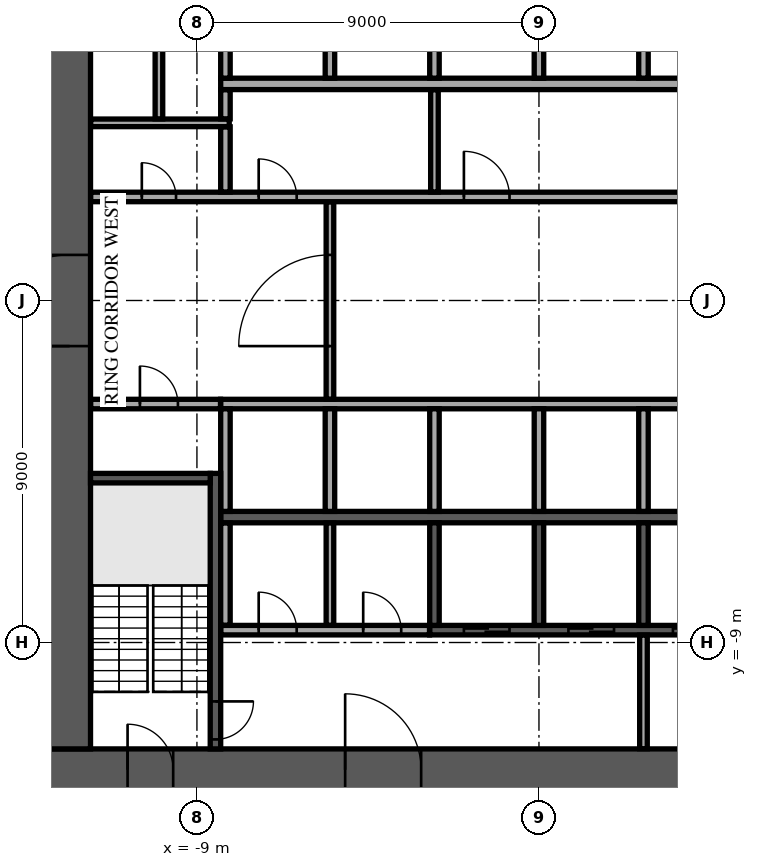
"""IFC4 building model, lengths in metres.
Left out: names, types, materials, properties, quantities, classifications, styles, units other than length and angle.
Written with IfcOpenShell. Run it as: python <this file> out.ifc"""

import sys

from ifc_helpers import new_model, si_unit, direction, frame, frame_2d, origin, place, context, subcontext, project, spatial, rectangle, extrude, element, fill, save


model = new_model("IFC4")
c1 = context("Model", 3, precision=1e-05, world=origin(), true_north=direction((0.0, 1.0)))
c2 = subcontext(c1, "Body", "Model", "MODEL_VIEW")
j1 = project(units=[si_unit("LENGTHUNIT", "METRE"), si_unit("PLANEANGLEUNIT", "RADIAN")], contexts=[c1])
p1 = place(None, origin())
s1 = spatial("IfcSite", under=j1, at=p1, CompositionType="ELEMENT")
p2 = place(p1, origin())
s2 = spatial("IfcBuilding", under=s1, at=p2, CompositionType="ELEMENT")
p3 = place(p2, frame((0.0, 0.0, 86.1)))
s3 = spatial("IfcBuildingStorey", under=s2, at=p3, CompositionType="ELEMENT", Elevation=86.1)
p4 = place(p3, frame((-12.9, -12.35, 0.0), z_axis=(0.0, 0.0, 1.0), x_axis=(1.0, 0.0, 0.0)))
e1 = element("IfcWall", 1, at=p4, inside=s3, PredefinedType="SHEAR", context=c2, shape_type="SweptSolid", body=[
    extrude(rectangle(XDim=25.8, YDim=1.1, at=frame_2d((12.9, 0.0))), origin(), (0.0, 0.0, 1.0), 3.58),
])
p5 = place(p4, frame((7.8, 0.0, 0.0)))
e2 = element("IfcOpeningElement", 2, at=p5, cuts=e1, PredefinedType="OPENING", context=c2, shape_type="SweptSolid", body=[
    extrude(rectangle(XDim=2.0, YDim=2.1, at=frame_2d((1.0, 1.05))), frame((0.0, 0.56, 0.0), z_axis=(0.0, -1.0, 0.0), x_axis=(1.0, 0.0, 0.0)), (0.0, 0.0, 1.0), 1.12),
])
p6 = place(p4, frame((17.925, 0.0, 0.0)))
e3 = element("IfcOpeningElement", 3, at=p6, cuts=e1, PredefinedType="OPENING", context=c2, shape_type="SweptSolid", body=[
    extrude(rectangle(XDim=1.2, YDim=2.1, at=frame_2d((0.6, 1.05))), frame((0.0, 0.56, 0.0), z_axis=(0.0, -1.0, 0.0), x_axis=(1.0, 0.0, 0.0)), (0.0, 0.0, 1.0), 1.12),
])
p7 = place(p4, frame((2.075, 0.0, 0.0)))
e4 = element("IfcOpeningElement", 4, at=p7, cuts=e1, PredefinedType="OPENING", context=c2, shape_type="SweptSolid", body=[
    extrude(rectangle(XDim=1.2, YDim=2.1, at=frame_2d((0.6, 1.05))), frame((0.0, 0.56, 0.0), z_axis=(0.0, -1.0, 0.0), x_axis=(1.0, 0.0, 0.0)), (0.0, 0.0, 1.0), 1.12),
])
p8 = place(p4, frame((22.525, 0.0, 0.0)))
e5 = element("IfcOpeningElement", 5, at=p8, cuts=e1, PredefinedType="OPENING", context=c2, shape_type="SweptSolid", body=[
    extrude(rectangle(XDim=1.2, YDim=2.1, at=frame_2d((0.6, 1.05))), frame((0.0, 0.56, 0.0), z_axis=(0.0, -1.0, 0.0), x_axis=(1.0, 0.0, 0.0)), (0.0, 0.0, 1.0), 1.12),
])
p9 = place(p3, frame((-12.35, -11.8, 0.0), z_axis=(0.0, 0.0, 1.0), x_axis=(0.0, 1.0, 0.0)))
e6 = element("IfcWall", 6, at=p9, inside=s3, PredefinedType="SHEAR", context=c2, shape_type="SweptSolid", body=[
    extrude(rectangle(XDim=23.6, YDim=1.1, at=frame_2d((11.8, 0.0))), origin(), (0.0, 0.0, 1.0), 3.58),
])
p10 = place(p9, frame((10.6, 0.0, 0.0)))
e7 = element("IfcOpeningElement", 7, at=p10, cuts=e6, PredefinedType="OPENING", context=c2, shape_type="SweptSolid", body=[
    extrude(rectangle(XDim=2.4, YDim=2.4, at=frame_2d((1.2, 1.2))), frame((0.0, 0.56, 0.0), z_axis=(0.0, -1.0, 0.0), x_axis=(1.0, 0.0, 0.0)), (0.0, 0.0, 1.0), 1.12),
])
for number, where, z_axis, x_axis in (
    (8, (-8.375, 5.7, 0.0), (0.0, 0.0, 1.0), (1.0, 0.0, 0.0)),
    (9, (-8.375, -5.7, 0.0), (0.0, 0.0, 1.0), (1.0, 0.0, 0.0)),
):
    element("IfcWall", number, at=place(p3, frame(where, z_axis=z_axis, x_axis=x_axis)), inside=s3, PredefinedType="SOLIDWALL", context=c2, shape_type="SweptSolid", body=[
        extrude(rectangle(XDim=16.75, YDim=0.3, at=frame_2d((8.375, 0.0))), origin(), (0.0, 0.0, 1.0), 3.58),
    ])
for number, where, z_axis, x_axis in (
    (10, (-8.25, 5.85, 0.0), (0.0, 0.0, 1.0), (0.0, 1.0, 0.0)),
    (11, (-5.5, 5.85, 0.0), (0.0, 0.0, 1.0), (0.0, 1.0, 0.0)),
    (12, (-2.75, 5.85, 0.0), (0.0, 0.0, 1.0), (0.0, 1.0, 0.0)),
    (13, (0.0, 5.85, 0.0), (0.0, 0.0, 1.0), (0.0, 1.0, 0.0)),
    (14, (2.75, 5.85, 0.0), (0.0, 0.0, 1.0), (0.0, 1.0, 0.0)),
):
    element("IfcWall", number, at=place(p3, frame(where, z_axis=z_axis, x_axis=x_axis)), inside=s3, PredefinedType="SOLIDWALL", context=c2, shape_type="SweptSolid", body=[
        extrude(rectangle(XDim=2.7, YDim=0.25, at=frame_2d((1.35, 0.0))), origin(), (0.0, 0.0, 1.0), 3.58),
    ])
p11 = place(p3, frame((-8.375, -2.725, 0.0), z_axis=(0.0, 0.0, 1.0), x_axis=(1.0, 0.0, 0.0)))
e15 = element("IfcWall", 15, at=p11, inside=s3, PredefinedType="SOLIDWALL", context=c2, shape_type="SweptSolid", body=[
    extrude(rectangle(XDim=14.0, YDim=0.25, at=frame_2d((7.0, 0.0))), origin(), (0.0, 0.0, 1.0), 3.58),
])
for number, where, z_axis, x_axis in (
    (16, (-8.25, -5.55, 0.0), (0.0, 0.0, 1.0), (0.0, 1.0, 0.0)),
    (17, (-5.5, -5.55, 0.0), (0.0, 0.0, 1.0), (0.0, 1.0, 0.0)),
    (18, (-2.75, -5.55, 0.0), (0.0, 0.0, 1.0), (0.0, 1.0, 0.0)),
    (19, (0.0, -5.55, 0.0), (0.0, 0.0, 1.0), (0.0, 1.0, 0.0)),
    (20, (2.75, -5.55, 0.0), (0.0, 0.0, 1.0), (0.0, 1.0, 0.0)),
):
    element("IfcWall", number, at=place(p3, frame(where, z_axis=z_axis, x_axis=x_axis)), inside=s3, PredefinedType="SOLIDWALL", context=c2, shape_type="SweptSolid", body=[
        extrude(rectangle(XDim=2.7, YDim=0.25, at=frame_2d((1.35, 0.0))), origin(), (0.0, 0.0, 1.0), 3.58),
    ])
p12 = place(p3, frame((-2.875, -8.675, 0.0), z_axis=(0.0, 0.0, 1.0), x_axis=(1.0, 0.0, 0.0)))
e21 = element("IfcWall", 21, at=p12, inside=s3, PredefinedType="SOLIDWALL", context=c2, shape_type="SweptSolid", body=[
    extrude(rectangle(XDim=11.25, YDim=0.25, at=frame_2d((5.625, 0.0))), origin(), (0.0, 0.0, 1.0), 3.58),
])
p13 = place(p12, frame((0.9, 0.0, 0.0)))
e22 = element("IfcOpeningElement", 22, at=p13, cuts=e21, PredefinedType="OPENING", context=c2, shape_type="SweptSolid", body=[
    extrude(rectangle(XDim=1.2, YDim=2.1, at=frame_2d((0.6, 1.05))), frame((0.0, 0.135, 0.0), z_axis=(0.0, -1.0, 0.0), x_axis=(1.0, 0.0, 0.0)), (0.0, 0.0, 1.0), 0.27),
])
p14 = place(p12, frame((3.65, 0.0, 0.0)))
e23 = element("IfcOpeningElement", 23, at=p14, cuts=e21, PredefinedType="OPENING", context=c2, shape_type="SweptSolid", body=[
    extrude(rectangle(XDim=1.2, YDim=2.1, at=frame_2d((0.6, 1.05))), frame((0.0, 0.135, 0.0), z_axis=(0.0, -1.0, 0.0), x_axis=(1.0, 0.0, 0.0)), (0.0, 0.0, 1.0), 0.27),
])
p15 = place(p12, frame((6.4, 0.0, 0.0)))
e24 = element("IfcOpeningElement", 24, at=p15, cuts=e21, PredefinedType="OPENING", context=c2, shape_type="SweptSolid", body=[
    extrude(rectangle(XDim=1.2, YDim=2.1, at=frame_2d((0.6, 1.05))), frame((0.0, 0.135, 0.0), z_axis=(0.0, -1.0, 0.0), x_axis=(1.0, 0.0, 0.0)), (0.0, 0.0, 1.0), 0.27),
])
p16 = place(p12, frame((9.15, 0.0, 0.0)))
e25 = element("IfcOpeningElement", 25, at=p16, cuts=e21, PredefinedType="OPENING", context=c2, shape_type="SweptSolid", body=[
    extrude(rectangle(XDim=1.2, YDim=2.1, at=frame_2d((0.6, 1.05))), frame((0.0, 0.135, 0.0), z_axis=(0.0, -1.0, 0.0), x_axis=(1.0, 0.0, 0.0)), (0.0, 0.0, 1.0), 0.27),
])
for number, where, z_axis, x_axis in (
    (26, (-2.75, -8.55, 0.0), (0.0, 0.0, 1.0), (0.0, 1.0, 0.0)),
    (27, (0.0, -8.55, 0.0), (0.0, 0.0, 1.0), (0.0, 1.0, 0.0)),
    (28, (2.75, -8.55, 0.0), (0.0, 0.0, 1.0), (0.0, 1.0, 0.0)),
):
    element("IfcWall", number, at=place(p3, frame(where, z_axis=z_axis, x_axis=x_axis)), inside=s3, PredefinedType="SOLIDWALL", context=c2, shape_type="SweptSolid", body=[
        extrude(rectangle(XDim=2.7, YDim=0.25, at=frame_2d((1.35, 0.0))), origin(), (0.0, 0.0, 1.0), 3.58),
    ])
p17 = place(p3, frame((-8.512, -4.55, 0.0), z_axis=(0.0, 0.0, 1.0), x_axis=(0.0, -1.0, 0.0)))
e29 = element("IfcWall", 29, at=p17, inside=s3, PredefinedType="SOLIDWALL", context=c2, shape_type="SweptSolid", body=[
    extrude(rectangle(XDim=7.25, YDim=0.275, at=frame_2d((3.625, 0.0))), origin(), (0.0, 0.0, 1.0), 3.58),
])
p18 = place(p17, frame((6.0, 0.0, 0.0)))
e30 = element("IfcOpeningElement", 30, at=p18, cuts=e29, PredefinedType="OPENING", context=c2, shape_type="SweptSolid", body=[
    extrude(rectangle(XDim=1.0, YDim=2.1, at=frame_2d((0.5, 1.05))), frame((0.0, 0.147, 0.0), z_axis=(0.0, -1.0, 0.0), x_axis=(1.0, 0.0, 0.0)), (0.0, 0.0, 1.0), 0.295),
])
p19 = place(p3, frame((-8.65, -4.675, 0.0), z_axis=(0.0, 0.0, 1.0), x_axis=(-1.0, 0.0, 0.0)))
e31 = element("IfcWall", 31, at=p19, inside=s3, PredefinedType="SOLIDWALL", context=c2, shape_type="SweptSolid", body=[
    extrude(rectangle(XDim=3.15, YDim=0.25, at=frame_2d((1.575, 0.0))), origin(), (0.0, 0.0, 1.0), 3.58),
])
p20 = place(p3, frame((2.75, -11.795, 0.0), z_axis=(0.0, 0.0, 1.0), x_axis=(0.0, 1.0, 0.0)))
e32 = element("IfcWall", 32, at=p20, inside=s3, PredefinedType="PARTITIONING", context=c2, shape_type="SweptSolid", body=[
    extrude(rectangle(XDim=2.99, YDim=0.2, at=frame_2d((1.495, 0.0))), origin(), (0.0, 0.0, 1.0), 3.58),
])
p21 = place(p3, frame((-8.37, -8.675, 0.0), z_axis=(0.0, 0.0, 1.0), x_axis=(1.0, 0.0, 0.0)))
e33 = element("IfcWall", 33, at=p21, inside=s3, PredefinedType="PARTITIONING", context=c2, shape_type="SweptSolid", body=[
    extrude(rectangle(XDim=5.49, YDim=0.25, at=frame_2d((2.745, 0.0))), origin(), (0.0, 0.0, 1.0), 3.58),
])
p22 = place(p21, frame((0.995, 0.0, 0.0)))
e34 = element("IfcOpeningElement", 34, at=p22, cuts=e33, PredefinedType="OPENING", context=c2, shape_type="SweptSolid", body=[
    extrude(rectangle(XDim=1.0, YDim=2.1, at=frame_2d((0.5, 1.05))), frame((0.0, 0.135, 0.0), z_axis=(0.0, -1.0, 0.0), x_axis=(1.0, 0.0, 0.0)), (0.0, 0.0, 1.0), 0.27),
])
p23 = place(p21, frame((3.745, 0.0, 0.0)))
e35 = element("IfcOpeningElement", 35, at=p23, cuts=e33, PredefinedType="OPENING", context=c2, shape_type="SweptSolid", body=[
    extrude(rectangle(XDim=1.0, YDim=2.1, at=frame_2d((0.5, 1.05))), frame((0.0, 0.135, 0.0), z_axis=(0.0, -1.0, 0.0), x_axis=(1.0, 0.0, 0.0)), (0.0, 0.0, 1.0), 0.27),
])
p24 = place(p3, frame((-8.25, -8.545, 0.0), z_axis=(0.0, 0.0, 1.0), x_axis=(0.0, 1.0, 0.0)))
e36 = element("IfcWall", 36, at=p24, inside=s3, PredefinedType="PARTITIONING", context=c2, shape_type="SweptSolid", body=[
    extrude(rectangle(XDim=2.69, YDim=0.25, at=frame_2d((1.345, 0.0))), origin(), (0.0, 0.0, 1.0), 3.58),
])
p25 = place(p3, frame((-5.5, -8.545, 0.0), z_axis=(0.0, 0.0, 1.0), x_axis=(0.0, 1.0, 0.0)))
e37 = element("IfcWall", 37, at=p25, inside=s3, PredefinedType="PARTITIONING", context=c2, shape_type="SweptSolid", body=[
    extrude(rectangle(XDim=2.69, YDim=0.2, at=frame_2d((1.345, 0.0))), origin(), (0.0, 0.0, 1.0), 3.58),
])
p26 = place(p3, frame((-11.795, -2.725, 0.0), z_axis=(0.0, 0.0, 1.0), x_axis=(1.0, 0.0, 0.0)))
e38 = element("IfcWall", 38, at=p26, inside=s3, PredefinedType="PARTITIONING", context=c2, shape_type="SweptSolid", body=[
    extrude(rectangle(XDim=3.415, YDim=0.25, at=frame_2d((1.708, 0.0))), origin(), (0.0, 0.0, 1.0), 3.58),
])
p27 = place(p26, frame((1.295, 0.0, 0.0)))
e39 = element("IfcOpeningElement", 39, at=p27, cuts=e38, PredefinedType="OPENING", context=c2, shape_type="SweptSolid", body=[
    extrude(rectangle(XDim=1.0, YDim=2.1, at=frame_2d((0.5, 1.05))), frame((0.0, 0.135, 0.0), z_axis=(0.0, -1.0, 0.0), x_axis=(1.0, 0.0, 0.0)), (0.0, 0.0, 1.0), 0.27),
])
p28 = place(p3, frame((-5.5, -2.595, 0.0), z_axis=(0.0, 0.0, 1.0), x_axis=(0.0, 1.0, 0.0)))
e40 = element("IfcWall", 40, at=p28, inside=s3, PredefinedType="PARTITIONING", context=c2, shape_type="SweptSolid", body=[
    extrude(rectangle(XDim=5.19, YDim=0.2, at=frame_2d((2.595, 0.0))), origin(), (0.0, 0.0, 1.0), 3.58),
])
p29 = place(p28, frame((1.395, 0.0, 0.0)))
e41 = element("IfcOpeningElement", 41, at=p29, cuts=e40, PredefinedType="OPENING", context=c2, shape_type="SweptSolid", body=[
    extrude(rectangle(XDim=2.4, YDim=2.4, at=frame_2d((1.2, 1.2))), frame((0.0, 0.11, 0.0), z_axis=(0.0, -1.0, 0.0), x_axis=(1.0, 0.0, 0.0)), (0.0, 0.0, 1.0), 0.22),
])
p30 = place(p3, frame((-11.795, 2.725, 0.0), z_axis=(0.0, 0.0, 1.0), x_axis=(1.0, 0.0, 0.0)))
e42 = element("IfcWall", 42, at=p30, inside=s3, PredefinedType="PARTITIONING", context=c2, shape_type="SweptSolid", body=[
    extrude(rectangle(XDim=23.59, YDim=0.25, at=frame_2d((11.795, 0.0))), origin(), (0.0, 0.0, 1.0), 3.58),
])
p31 = place(p30, frame((21.345, 0.0, 0.0)))
e43 = element("IfcOpeningElement", 43, at=p31, cuts=e42, PredefinedType="OPENING", context=c2, shape_type="SweptSolid", body=[
    extrude(rectangle(XDim=0.9, YDim=2.1, at=frame_2d((0.45, 1.05))), frame((0.0, 0.135, 0.0), z_axis=(0.0, -1.0, 0.0), x_axis=(1.0, 0.0, 0.0)), (0.0, 0.0, 1.0), 0.27),
])
p32 = place(p30, frame((1.345, 0.0, 0.0)))
e44 = element("IfcOpeningElement", 44, at=p32, cuts=e42, PredefinedType="OPENING", context=c2, shape_type="SweptSolid", body=[
    extrude(rectangle(XDim=0.9, YDim=2.1, at=frame_2d((0.45, 1.05))), frame((0.0, 0.135, 0.0), z_axis=(0.0, -1.0, 0.0), x_axis=(1.0, 0.0, 0.0)), (0.0, 0.0, 1.0), 0.27),
])
p33 = place(p30, frame((4.42, 0.0, 0.0)))
e45 = element("IfcOpeningElement", 45, at=p33, cuts=e42, PredefinedType="OPENING", context=c2, shape_type="SweptSolid", body=[
    extrude(rectangle(XDim=1.0, YDim=2.1, at=frame_2d((0.5, 1.05))), frame((0.0, 0.135, 0.0), z_axis=(0.0, -1.0, 0.0), x_axis=(1.0, 0.0, 0.0)), (0.0, 0.0, 1.0), 0.27),
])
p34 = place(p30, frame((9.82, 0.0, 0.0)))
e46 = element("IfcOpeningElement", 46, at=p34, cuts=e42, PredefinedType="OPENING", context=c2, shape_type="SweptSolid", body=[
    extrude(rectangle(XDim=1.2, YDim=2.1, at=frame_2d((0.6, 1.05))), frame((0.0, 0.135, 0.0), z_axis=(0.0, -1.0, 0.0), x_axis=(1.0, 0.0, 0.0)), (0.0, 0.0, 1.0), 0.27),
])
p35 = place(p3, frame((-8.25, 2.855, 0.0), z_axis=(0.0, 0.0, 1.0), x_axis=(0.0, 1.0, 0.0)))
e47 = element("IfcWall", 47, at=p35, inside=s3, PredefinedType="PARTITIONING", context=c2, shape_type="SweptSolid", body=[
    extrude(rectangle(XDim=1.715, YDim=0.25, at=frame_2d((0.857, 0.0))), origin(), (0.0, 0.0, 1.0), 3.58),
])
p36 = place(p3, frame((-2.75, 2.855, 0.0), z_axis=(0.0, 0.0, 1.0), x_axis=(0.0, 1.0, 0.0)))
e48 = element("IfcWall", 48, at=p36, inside=s3, PredefinedType="PARTITIONING", context=c2, shape_type="SweptSolid", body=[
    extrude(rectangle(XDim=2.69, YDim=0.2, at=frame_2d((1.345, 0.0))), origin(), (0.0, 0.0, 1.0), 3.58),
])
p37 = place(p3, frame((-11.795, 4.675, 0.0), z_axis=(0.0, 0.0, 1.0), x_axis=(1.0, 0.0, 0.0)))
e49 = element("IfcWall", 49, at=p37, inside=s3, PredefinedType="PARTITIONING", context=c2, shape_type="SweptSolid", body=[
    extrude(rectangle(XDim=3.645, YDim=0.2, at=frame_2d((1.823, 0.0))), origin(), (0.0, 0.0, 1.0), 3.58),
])
p38 = place(p3, frame((-10.0, 4.78, 0.0), z_axis=(0.0, 0.0, 1.0), x_axis=(0.0, 1.0, 0.0)))
e50 = element("IfcWall", 50, at=p38, inside=s3, PredefinedType="PARTITIONING", context=c2, shape_type="SweptSolid", body=[
    extrude(rectangle(XDim=7.015, YDim=0.2, at=frame_2d((3.507, 0.0))), origin(), (0.0, 0.0, 1.0), 3.58),
])
p39 = place(p38, frame((2.92, 0.0, 0.0)))
e51 = element("IfcOpeningElement", 51, at=p39, cuts=e50, PredefinedType="OPENING", context=c2, shape_type="SweptSolid", body=[
    extrude(rectangle(XDim=1.0, YDim=2.1, at=frame_2d((0.5, 1.05))), frame((0.0, 0.11, 0.0), z_axis=(0.0, -1.0, 0.0), x_axis=(1.0, 0.0, 0.0)), (0.0, 0.0, 1.0), 0.22),
])
p40 = place(p3, frame((-8.25, 4.78, 0.0), z_axis=(0.0, 0.0, 1.0), x_axis=(0.0, 1.0, 0.0)))
e52 = element("IfcWall", 52, at=p40, inside=s3, PredefinedType="PARTITIONING", context=c2, shape_type="SweptSolid", body=[
    extrude(rectangle(XDim=0.765, YDim=0.25, at=frame_2d((0.382, 0.0))), origin(), (0.0, 0.0, 1.0), 3.58),
])
p41 = place(p5, origin())
e53 = element("IfcDoor", 53, at=p41, inside=s3, OperationType="SINGLE_SWING_LEFT", PredefinedType="DOOR", context=c2, shape_type="SweptSolid", body=[
    extrude(rectangle(XDim=2.0, YDim=2.1, at=frame_2d((1.0, 1.05))), frame((0.0, 0.025, 0.0), z_axis=(0.0, -1.0, 0.0), x_axis=(1.0, 0.0, 0.0)), (0.0, 0.0, 1.0), 0.05),
])
fill(e2, e53)
p42 = place(p7, origin())
e54 = element("IfcDoor", 54, at=p42, inside=s3, OperationType="SINGLE_SWING_LEFT", PredefinedType="DOOR", context=c2, shape_type="SweptSolid", body=[
    extrude(rectangle(XDim=1.2, YDim=2.1, at=frame_2d((0.6, 1.05))), frame((0.0, 0.025, 0.0), z_axis=(0.0, -1.0, 0.0), x_axis=(1.0, 0.0, 0.0)), (0.0, 0.0, 1.0), 0.05),
])
fill(e4, e54)
p43 = place(p10, origin())
e55 = element("IfcDoor", 55, at=p43, inside=s3, OperationType="SINGLE_SWING_LEFT", PredefinedType="DOOR", context=c2, shape_type="SweptSolid", body=[
    extrude(rectangle(XDim=2.4, YDim=2.4, at=frame_2d((1.2, 1.2))), frame((0.0, 0.025, 0.0), z_axis=(0.0, -1.0, 0.0), x_axis=(1.0, 0.0, 0.0)), (0.0, 0.0, 1.0), 0.05),
])
fill(e7, e55)
p44 = place(p13, origin())
e56 = element("IfcDoor", 56, at=p44, inside=s3, OperationType="DOUBLE_DOOR_SLIDING", PredefinedType="DOOR", context=c2, shape_type="SweptSolid", body=[
    extrude(rectangle(XDim=1.2, YDim=2.1, at=frame_2d((0.6, 1.05))), frame((0.0, 0.025, 0.0), z_axis=(0.0, -1.0, 0.0), x_axis=(1.0, 0.0, 0.0)), (0.0, 0.0, 1.0), 0.05),
])
fill(e22, e56)
p45 = place(p14, origin())
e57 = element("IfcDoor", 57, at=p45, inside=s3, OperationType="DOUBLE_DOOR_SLIDING", PredefinedType="DOOR", context=c2, shape_type="SweptSolid", body=[
    extrude(rectangle(XDim=1.2, YDim=2.1, at=frame_2d((0.6, 1.05))), frame((0.0, 0.025, 0.0), z_axis=(0.0, -1.0, 0.0), x_axis=(1.0, 0.0, 0.0)), (0.0, 0.0, 1.0), 0.05),
])
fill(e23, e57)
p46 = place(p15, origin())
e58 = element("IfcDoor", 58, at=p46, inside=s3, OperationType="DOUBLE_DOOR_SLIDING", PredefinedType="DOOR", context=c2, shape_type="SweptSolid", body=[
    extrude(rectangle(XDim=1.2, YDim=2.1, at=frame_2d((0.6, 1.05))), frame((0.0, 0.025, 0.0), z_axis=(0.0, -1.0, 0.0), x_axis=(1.0, 0.0, 0.0)), (0.0, 0.0, 1.0), 0.05),
])
fill(e24, e58)
p47 = place(p18, origin())
e59 = element("IfcDoor", 59, at=p47, inside=s3, OperationType="SINGLE_SWING_LEFT", PredefinedType="DOOR", context=c2, shape_type="SweptSolid", body=[
    extrude(rectangle(XDim=1.0, YDim=2.1, at=frame_2d((0.5, 1.05))), frame((0.0, 0.025, 0.0), z_axis=(0.0, -1.0, 0.0), x_axis=(1.0, 0.0, 0.0)), (0.0, 0.0, 1.0), 0.05),
])
fill(e30, e59)
p48 = place(p22, origin())
e60 = element("IfcDoor", 60, at=p48, inside=s3, OperationType="SINGLE_SWING_RIGHT", PredefinedType="DOOR", context=c2, shape_type="SweptSolid", body=[
    extrude(rectangle(XDim=1.0, YDim=2.1, at=frame_2d((0.5, 1.05))), frame((0.0, 0.025, 0.0), z_axis=(0.0, -1.0, 0.0), x_axis=(1.0, 0.0, 0.0)), (0.0, 0.0, 1.0), 0.05),
])
fill(e34, e60)
p49 = place(p23, origin())
e61 = element("IfcDoor", 61, at=p49, inside=s3, OperationType="SINGLE_SWING_RIGHT", PredefinedType="DOOR", context=c2, shape_type="SweptSolid", body=[
    extrude(rectangle(XDim=1.0, YDim=2.1, at=frame_2d((0.5, 1.05))), frame((0.0, 0.025, 0.0), z_axis=(0.0, -1.0, 0.0), x_axis=(1.0, 0.0, 0.0)), (0.0, 0.0, 1.0), 0.05),
])
fill(e35, e61)
p50 = place(p27, origin())
e62 = element("IfcDoor", 62, at=p50, inside=s3, OperationType="SINGLE_SWING_RIGHT", PredefinedType="DOOR", context=c2, shape_type="SweptSolid", body=[
    extrude(rectangle(XDim=1.0, YDim=2.1, at=frame_2d((0.5, 1.05))), frame((0.0, 0.025, 0.0), z_axis=(0.0, -1.0, 0.0), x_axis=(1.0, 0.0, 0.0)), (0.0, 0.0, 1.0), 0.05),
])
fill(e39, e62)
p51 = place(p32, origin())
e63 = element("IfcDoor", 63, at=p51, inside=s3, OperationType="SINGLE_SWING_RIGHT", PredefinedType="DOOR", context=c2, shape_type="SweptSolid", body=[
    extrude(rectangle(XDim=0.9, YDim=2.1, at=frame_2d((0.45, 1.05))), frame((0.0, 0.025, 0.0), z_axis=(0.0, -1.0, 0.0), x_axis=(1.0, 0.0, 0.0)), (0.0, 0.0, 1.0), 0.05),
])
fill(e44, e63)
p52 = place(p33, origin())
e64 = element("IfcDoor", 64, at=p52, inside=s3, OperationType="SINGLE_SWING_RIGHT", PredefinedType="DOOR", context=c2, shape_type="SweptSolid", body=[
    extrude(rectangle(XDim=1.0, YDim=2.1, at=frame_2d((0.5, 1.05))), frame((0.0, 0.025, 0.0), z_axis=(0.0, -1.0, 0.0), x_axis=(1.0, 0.0, 0.0)), (0.0, 0.0, 1.0), 0.05),
])
fill(e45, e64)
p53 = place(p34, origin())
e65 = element("IfcDoor", 65, at=p53, inside=s3, OperationType="SINGLE_SWING_LEFT", PredefinedType="DOOR", context=c2, shape_type="SweptSolid", body=[
    extrude(rectangle(XDim=1.2, YDim=2.1, at=frame_2d((0.6, 1.05))), frame((0.0, 0.025, 0.0), z_axis=(0.0, -1.0, 0.0), x_axis=(1.0, 0.0, 0.0)), (0.0, 0.0, 1.0), 0.05),
])
fill(e46, e65)
p54 = place(p29, origin())
e66 = element("IfcDoor", 66, at=p54, inside=s3, OperationType="DOUBLE_DOOR_DOUBLE_SWING", PredefinedType="DOOR", context=c2, shape_type="SweptSolid", body=[
    extrude(rectangle(XDim=2.4, YDim=2.4, at=frame_2d((1.2, 1.2))), frame((0.0, 0.025, 0.0), z_axis=(0.0, -1.0, 0.0), x_axis=(1.0, 0.0, 0.0)), (0.0, 0.0, 1.0), 0.05),
])
fill(e41, e66)
save(model, sys.argv[1])
